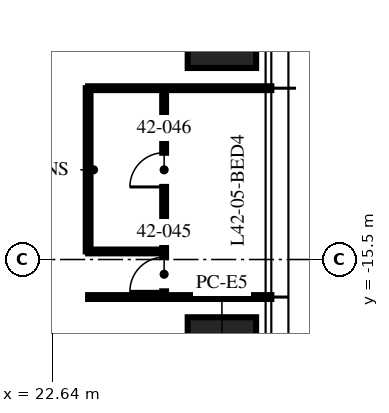
"""IFC4 building model, lengths in metres.
Left out: names, types, materials, properties, quantities, classifications, styles, units other than length and angle.
Written with IfcOpenShell. Run it as: python <this file> out.ifc"""

import sys

from ifc_helpers import new_model, si_unit, direction, frame, frame_2d, origin, origin_2d, place, context, subcontext, project, spatial, rectangle, extrude, element, fill, save


model = new_model("IFC4")
c1 = context("Model", 3, precision=1e-05, world=origin(), true_north=direction((0.0, 1.0)))
c2 = subcontext(c1, "Body", "Model", "MODEL_VIEW")
j1 = project(units=[si_unit("LENGTHUNIT", "METRE"), si_unit("PLANEANGLEUNIT", "RADIAN")], contexts=[c1])
p1 = place(None, origin())
s1 = spatial("IfcSite", under=j1, at=p1, CompositionType="ELEMENT")
p2 = place(p1, origin())
s2 = spatial("IfcBuilding", under=s1, at=p2, CompositionType="ELEMENT")
p3 = place(p2, frame((0.0, 0.0, 167.25)))
s3 = spatial("IfcBuildingStorey", under=s2, at=p3, CompositionType="ELEMENT", Elevation=167.25)
for number, where, z_axis, x_axis in (
    (1, (27.1, -9.16, 0.0), (0.0, 0.0, 1.0), (0.0, 1.0, 0.0)),
    (2, (27.1, -18.32, 0.0), (0.0, 0.0, 1.0), (0.0, 1.0, 0.0)),
):
    element("IfcColumn", number, at=place(p3, frame(where, z_axis=z_axis, x_axis=x_axis)), inside=s3, PredefinedType="COLUMN", context=c2, shape_type="SweptSolid", body=[
        extrude(rectangle(XDim=2.6, YDim=1.8, at=origin_2d()), origin(), (0.0, 0.0, 1.0), 3.75),
    ])
for number, where, z_axis, x_axis in (
    (3, (23.58, -16.488, 0.0), (0.0, 0.0, 1.0), (1.0, 0.0, 0.0)),
    (4, (23.58, -10.992, 0.0), (0.0, 0.0, 1.0), (1.0, 0.0, 0.0)),
):
    element("IfcWall", number, at=place(p3, frame(where, z_axis=z_axis, x_axis=x_axis)), inside=s3, PredefinedType="PARTITIONING", context=c2, shape_type="SweptSolid", body=[
        extrude(rectangle(XDim=4.82, YDim=0.1, at=frame_2d((2.41, 0.0))), origin(), (0.0, 0.0, 1.0), 2.81),
    ])
p4 = place(p3, frame((25.58, -16.488, 0.0), z_axis=(0.0, 0.0, 1.0), x_axis=(0.0, 1.0, 0.0)))
e5 = element("IfcWall", 5, at=p4, inside=s3, PredefinedType="PARTITIONING", context=c2, shape_type="SweptSolid", body=[
    extrude(rectangle(XDim=5.496, YDim=0.1, at=frame_2d((2.748, 0.0))), origin(), (0.0, 0.0, 1.0), 2.81),
])
p5 = place(p4, frame((0.15, 0.0, 0.0)))
e6 = element("IfcOpeningElement", 6, at=p5, cuts=e5, PredefinedType="OPENING", context=c2, shape_type="SweptSolid", body=[
    extrude(rectangle(XDim=0.9, YDim=2.1, at=frame_2d((0.45, 1.05))), frame((0.0, 0.06, 0.0), z_axis=(0.0, -1.0, 0.0), x_axis=(1.0, 0.0, 0.0)), (0.0, 0.0, 1.0), 0.12),
])
p6 = place(p4, frame((2.898, 0.0, 0.0)))
e7 = element("IfcOpeningElement", 7, at=p6, cuts=e5, PredefinedType="OPENING", context=c2, shape_type="SweptSolid", body=[
    extrude(rectangle(XDim=0.9, YDim=2.1, at=frame_2d((0.45, 1.05))), frame((0.0, 0.06, 0.0), z_axis=(0.0, -1.0, 0.0), x_axis=(1.0, 0.0, 0.0)), (0.0, 0.0, 1.0), 0.12),
])
p7 = place(p3, frame((23.58, -15.288, 0.0), z_axis=(0.0, 0.0, 1.0), x_axis=(1.0, 0.0, 0.0)))
e8 = element("IfcWall", 8, at=p7, inside=s3, PredefinedType="PARTITIONING", context=c2, shape_type="SweptSolid", body=[
    extrude(rectangle(XDim=2.0, YDim=0.1, at=frame_2d((1.0, 0.0))), origin(), (0.0, 0.0, 1.0), 3.5),
])
p8 = place(p3, frame((23.58, -15.288, 0.0), z_axis=(0.0, 0.0, 1.0), x_axis=(0.0, 1.0, 0.0)))
e9 = element("IfcWall", 9, at=p8, inside=s3, PredefinedType="PARTITIONING", context=c2, shape_type="SweptSolid", body=[
    extrude(rectangle(XDim=4.296, YDim=0.125, at=frame_2d((2.148, 0.0))), origin(), (0.0, 0.0, 1.0), 2.81),
])
p9 = place(p5, origin())
e10 = element("IfcDoor", 10, at=p9, inside=s3, OperationType="SINGLE_SWING_LEFT", PredefinedType="DOOR", context=c2, shape_type="SweptSolid", body=[
    extrude(rectangle(XDim=0.9, YDim=2.1, at=frame_2d((0.45, 1.05))), frame((0.0, 0.025, 0.0), z_axis=(0.0, -1.0, 0.0), x_axis=(1.0, 0.0, 0.0)), (0.0, 0.0, 1.0), 0.05),
])
fill(e6, e10)
p10 = place(p6, origin())
e11 = element("IfcDoor", 11, at=p10, inside=s3, OperationType="SINGLE_SWING_LEFT", PredefinedType="DOOR", context=c2, shape_type="SweptSolid", body=[
    extrude(rectangle(XDim=0.9, YDim=2.1, at=frame_2d((0.45, 1.05))), frame((0.0, 0.025, 0.0), z_axis=(0.0, -1.0, 0.0), x_axis=(1.0, 0.0, 0.0)), (0.0, 0.0, 1.0), 0.05),
])
fill(e7, e11)
save(model, sys.argv[1])
